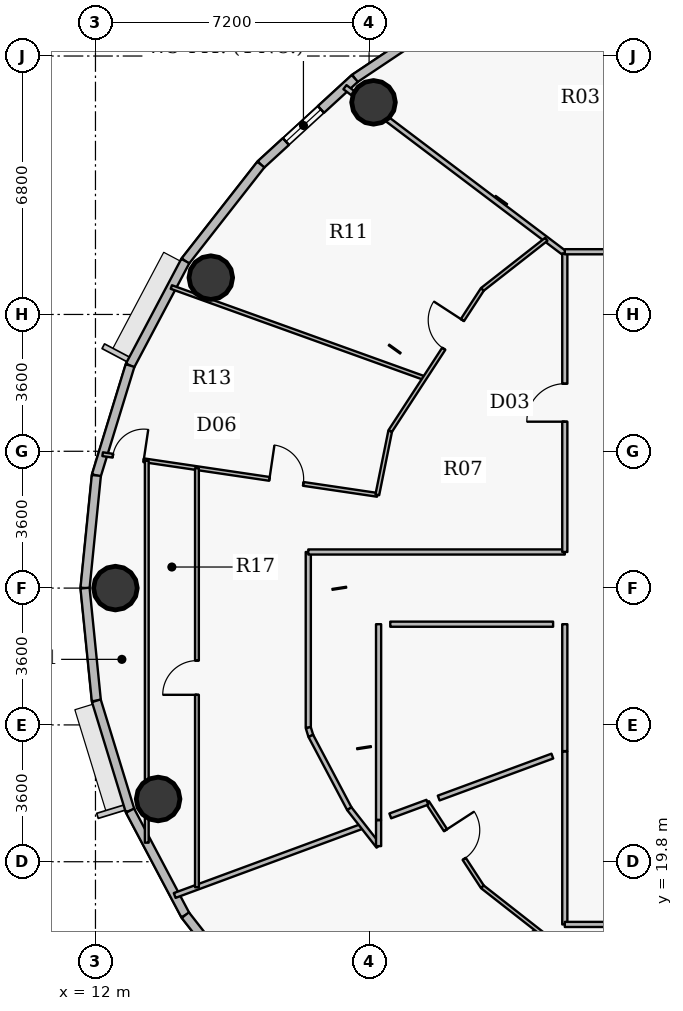
"""IFC4 building model, lengths in metres.
Left out: names, types, materials, properties, quantities, classifications, styles, units other than length and angle.
Written with IfcOpenShell. Run it as: python <this file> out.ifc"""

import sys

from ifc_helpers import new_model, si_unit, direction, frame, frame_2d, origin, origin_2d, place, context, subcontext, project, spatial, rectangle, hollow_circle, extrude, source, transform, mapped, element, fill, save


model = new_model("IFC4")
c1 = context("Model", 3, precision=1e-05, world=origin(), true_north=direction((0.0, 1.0)))
c2 = subcontext(c1, "Body", "Model", "MODEL_VIEW")
j1 = project(units=[si_unit("LENGTHUNIT", "METRE"), si_unit("PLANEANGLEUNIT", "RADIAN")], contexts=[c1])
p1 = place(None, origin())
s1 = spatial("IfcSite", under=j1, at=p1, CompositionType="ELEMENT")
p2 = place(p1, origin())
s2 = spatial("IfcBuilding", under=s1, at=p2, CompositionType="ELEMENT")
p3 = place(p2, frame((0.0, 0.0, 214.05)))
s3 = spatial("IfcBuildingStorey", under=s2, at=p3, CompositionType="ELEMENT", Elevation=214.05)
for number, where, z_axis, x_axis in (
    (1, (19.317, 39.781, 0.0), (0.0, 0.0, 1.0), (1.0, 0.0, 0.0)),
    (2, (15.035, 35.169, 0.0), (0.0, 0.0, 1.0), (1.0, 0.0, 0.0)),
    (3, (12.525, 27.0, 0.0), (0.0, 0.0, 1.0), (1.0, 0.0, 0.0)),
    (4, (13.649, 21.451, 0.0), (0.0, 0.0, 1.0), (1.0, 0.0, 0.0)),
):
    element("IfcColumn", number, at=place(p3, frame(where, z_axis=z_axis, x_axis=x_axis)), inside=s3, PredefinedType="COLUMN", context=c2, shape_type="SweptSolid", body=[
        extrude(hollow_circle(Radius=0.575, WallThickness=0.036, at=origin_2d()), origin(), (0.0, 0.0, 1.0), 3.75),
    ])
p4 = place(p3, frame((18.824, 40.411, 0.0), z_axis=(0.0, 0.0, 1.0), x_axis=(0.831262496074, 0.555880079352, 0.0)))
e5 = element("IfcWall", 5, at=p4, inside=s3, PredefinedType="SOLIDWALL", context=c2, shape_type="SweptSolid", body=[
    extrude(rectangle(XDim=3.484, YDim=0.24, at=frame_2d((1.742, 0.0))), origin(), (0.0, 0.0, 1.0), 3.5),
])
p5 = place(p3, frame((16.352, 38.145, 0.0), z_axis=(0.0, 0.0, 1.0), x_axis=(0.737123922599, 0.675757591694, 0.0)))
e6 = element("IfcWall", 6, at=p5, inside=s3, PredefinedType="SOLIDWALL", context=c2, shape_type="SweptSolid", body=[
    extrude(rectangle(XDim=3.354, YDim=0.24, at=frame_2d((1.677, 0.0))), origin(), (0.0, 0.0, 1.0), 3.5),
])
p6 = place(p5, frame((0.896, 0.0, 0.9)))
e7 = element("IfcOpeningElement", 7, at=p6, cuts=e6, PredefinedType="OPENING", context=c2, shape_type="SweptSolid", body=[
    extrude(rectangle(XDim=1.25, YDim=1.65, at=origin_2d()), frame((0.625, 0.13, 0.825), z_axis=(0.0, -1.0, 0.0), x_axis=(1.0, 0.0, 0.0)), (0.0, 0.0, 1.0), 0.26),
])
p7 = place(p3, frame((14.364, 35.605, 0.0), z_axis=(0.0, 0.0, 1.0), x_axis=(0.616312344705, 0.787501805562, 0.0)))
e8 = element("IfcWall", 8, at=p7, inside=s3, PredefinedType="SOLIDWALL", context=c2, shape_type="SweptSolid", body=[
    extrude(rectangle(XDim=3.225, YDim=0.24, at=frame_2d((1.612, 0.0))), origin(), (0.0, 0.0, 1.0), 3.5),
])
p8 = place(p3, frame((12.91, 32.856, 0.0), z_axis=(0.0, 0.0, 1.0), x_axis=(0.46766049993, 0.883908172157, 0.0)))
e9 = element("IfcWall", 9, at=p8, inside=s3, PredefinedType="SOLIDWALL", context=c2, shape_type="SweptSolid", body=[
    extrude(rectangle(XDim=3.11, YDim=0.24, at=frame_2d((1.555, 0.0))), origin(), (0.0, 0.0, 1.0), 3.5),
])
p9 = place(p3, frame((12.023, 29.964, 0.0), z_axis=(0.0, 0.0, 1.0), x_axis=(0.293132907334, 0.95607170162, 0.0)))
e10 = element("IfcWall", 10, at=p9, inside=s3, PredefinedType="SOLIDWALL", context=c2, shape_type="SweptSolid", body=[
    extrude(rectangle(XDim=3.025, YDim=0.24, at=frame_2d((1.512, 0.0))), origin(), (0.0, 0.0, 1.0), 3.5),
])
for number, where, z_axis, x_axis in (
    (11, (11.725, 27.0, 0.0), (0.0, 0.0, 1.0), (0.1, 0.995, 0.0)),
    (12, (12.023, 24.036, 0.0), (0.0, 0.0, 1.0), (-0.1, 0.995, 0.0)),
):
    element("IfcWall", number, at=place(p3, frame(where, z_axis=z_axis, x_axis=x_axis)), inside=s3, PredefinedType="SOLIDWALL", context=c2, shape_type="SweptSolid", body=[
        extrude(rectangle(XDim=2.979, YDim=0.24, at=frame_2d((1.489, 0.0))), origin(), (0.0, 0.0, 1.0), 3.5),
    ])
p10 = place(p3, frame((12.91, 21.144, 0.0), z_axis=(0.0, 0.0, 1.0), x_axis=(-0.293132907334, 0.95607170162, 0.0)))
e13 = element("IfcWall", 13, at=p10, inside=s3, PredefinedType="SOLIDWALL", context=c2, shape_type="SweptSolid", body=[
    extrude(rectangle(XDim=3.025, YDim=0.24, at=frame_2d((1.512, 0.0))), origin(), (0.0, 0.0, 1.0), 3.5),
])
p11 = place(p3, frame((14.364, 18.395, 0.0), z_axis=(0.0, 0.0, 1.0), x_axis=(-0.46766049993, 0.883908172157, 0.0)))
e14 = element("IfcWall", 14, at=p11, inside=s3, PredefinedType="SOLIDWALL", context=c2, shape_type="SweptSolid", body=[
    extrude(rectangle(XDim=3.11, YDim=0.24, at=frame_2d((1.555, 0.0))), origin(), (0.0, 0.0, 1.0), 3.5),
])
p12 = place(p3, frame((16.352, 15.855, 0.0), z_axis=(0.0, 0.0, 1.0), x_axis=(-0.616312344705, 0.787501805562, 0.0)))
e15 = element("IfcWall", 15, at=p12, inside=s3, PredefinedType="SOLIDWALL", context=c2, shape_type="SweptSolid", body=[
    extrude(rectangle(XDim=3.225, YDim=0.24, at=frame_2d((1.612, 0.0))), origin(), (0.0, 0.0, 1.0), 3.5),
])
p13 = place(p12, frame((0.812, 0.0, 0.9)))
e16 = element("IfcOpeningElement", 16, at=p13, cuts=e15, PredefinedType="OPENING", context=c2, shape_type="SweptSolid", body=[
    extrude(rectangle(XDim=1.6, YDim=1.75, at=origin_2d()), frame((0.8, 0.13, 0.875), z_axis=(0.0, -1.0, 0.0), x_axis=(1.0, 0.0, 0.0)), (0.0, 0.0, 1.0), 0.26),
])
p14 = place(p3, frame((12.189, 30.523, 0.0), z_axis=(0.0, 0.0, 1.0), x_axis=(0.98923000083, -0.146369414352, 0.0)))
e17 = element("IfcWall", 17, at=p14, inside=s3, PredefinedType="PARTITIONING", context=c2, shape_type="SweptSolid", body=[
    extrude(rectangle(XDim=7.306, YDim=0.1, at=frame_2d((3.653, 0.0))), origin(), (0.0, 0.0, 1.0), 2.985),
])
p15 = place(p14, frame((4.437, 0.0, 0.0)))
e18 = element("IfcOpeningElement", 18, at=p15, cuts=e17, PredefinedType="OPENING", context=c2, shape_type="SweptSolid", body=[
    extrude(rectangle(XDim=0.9, YDim=2.1, at=origin_2d()), frame((0.45, 0.06, 1.05), z_axis=(0.0, -1.0, 0.0), x_axis=(1.0, 0.0, 0.0)), (0.0, 0.0, 1.0), 0.12),
])
p16 = place(p14, frame((0.272, 0.0, 0.0)))
e19 = element("IfcOpeningElement", 19, at=p16, cuts=e17, PredefinedType="OPENING", context=c2, shape_type="SweptSolid", body=[
    extrude(rectangle(XDim=0.82, YDim=2.1, at=origin_2d()), frame((0.41, 0.06, 1.05), z_axis=(0.0, -1.0, 0.0), x_axis=(1.0, 0.0, 0.0)), (0.0, 0.0, 1.0), 0.12),
])
p17 = place(p3, frame((13.35, 20.301, 0.0), z_axis=(0.0, 0.0, 1.0), x_axis=(0.0, 1.0, 0.0)))
e20 = element("IfcWall", 20, at=p17, inside=s3, PredefinedType="PARTITIONING", context=c2, shape_type="SweptSolid", body=[
    extrude(rectangle(XDim=10.05, YDim=0.1, at=frame_2d((5.025, 0.0))), origin(), (0.0, 0.0, 1.0), 2.935),
])
p18 = place(p3, frame((13.997, 34.921, 0.0), z_axis=(0.0, 0.0, 1.0), x_axis=(0.940885654064, -0.338724351023, 0.0)))
e21 = element("IfcWall", 21, at=p18, inside=s3, PredefinedType="PARTITIONING", context=c2, shape_type="SweptSolid", body=[
    extrude(rectangle(XDim=7.082, YDim=0.1, at=frame_2d((3.541, 0.0))), origin(), (0.0, 0.0, 1.0), 2.985),
])
p19 = place(p3, frame((14.085, 18.912, 0.0), z_axis=(0.0, 0.0, 1.0), x_axis=(0.938158194698, 0.346206877055, 0.0)))
e22 = element("IfcWall", 22, at=p19, inside=s3, PredefinedType="PARTITIONING", context=c2, shape_type="SweptSolid", body=[
    extrude(rectangle(XDim=5.278, YDim=0.135, at=frame_2d((2.639, 0.0))), origin(), (0.0, 0.0, 1.0), 2.985),
])
p20 = place(p3, frame((14.67, 19.128, 0.0), z_axis=(0.0, 0.0, 1.0), x_axis=(0.0, 1.0, 0.0)))
e23 = element("IfcWall", 23, at=p20, inside=s3, PredefinedType="PARTITIONING", context=c2, shape_type="SweptSolid", body=[
    extrude(rectangle(XDim=11.028, YDim=0.1, at=frame_2d((5.514, 0.0))), origin(), (0.0, 0.0, 1.0), 2.935),
])
p21 = place(p20, frame((5.064, 0.0, 0.0)))
e24 = element("IfcOpeningElement", 24, at=p21, cuts=e23, PredefinedType="OPENING", context=c2, shape_type="SweptSolid", body=[
    extrude(rectangle(XDim=0.9, YDim=2.1, at=origin_2d()), frame((0.45, 0.06, 1.05), z_axis=(0.0, -1.0, 0.0), x_axis=(1.0, 0.0, 0.0)), (0.0, 0.0, 1.0), 0.12),
])
p22 = place(p3, frame((17.6, 23.328, 0.0), z_axis=(0.0, 0.0, 1.0), x_axis=(0.0, 1.0, 0.0)))
e25 = element("IfcWall", 25, at=p22, inside=s3, PredefinedType="PARTITIONING", context=c2, shape_type="SweptSolid", body=[
    extrude(rectangle(XDim=4.622, YDim=0.135, at=frame_2d((2.311, 0.0))), origin(), (0.0, 0.0, 1.0), 2.935),
])
p23 = place(p3, frame((17.6, 23.328, 0.0), z_axis=(0.0, 0.0, 1.0), x_axis=(0.292875000845, -0.956150738053, 0.0)))
e26 = element("IfcWall", 26, at=p23, inside=s3, PredefinedType="PARTITIONING", context=c2, shape_type="SweptSolid", body=[
    extrude(rectangle(XDim=0.227, YDim=0.135, at=frame_2d((0.113, 0.0))), origin(), (0.0, 0.0, 1.0), 3.5),
])
p24 = place(p3, frame((17.6, 27.95, 0.0), z_axis=(0.0, 0.0, 1.0), x_axis=(1.0, 0.0, 0.0)))
e27 = element("IfcWall", 27, at=p24, inside=s3, PredefinedType="PARTITIONING", context=c2, shape_type="SweptSolid", body=[
    extrude(rectangle(XDim=6.75, YDim=0.135, at=frame_2d((3.375, 0.0))), origin(), (0.0, 0.0, 1.0), 3.5),
])
p25 = place(p3, frame((17.667, 23.111, 0.0), z_axis=(0.0, 0.0, 1.0), x_axis=(0.467675622269, -0.883900171024, 0.0)))
e28 = element("IfcWall", 28, at=p25, inside=s3, PredefinedType="PARTITIONING", context=c2, shape_type="SweptSolid", body=[
    extrude(rectangle(XDim=2.168, YDim=0.135, at=frame_2d((1.084, 0.0))), origin(), (0.0, 0.0, 1.0), 2.935),
])
p26 = place(p3, frame((18.268, 14.092, 0.0), z_axis=(0.0, 0.0, 1.0), x_axis=(0.808481640117, 0.588521399436, 0.0)))
e29 = element("IfcWall", 29, at=p26, inside=s3, PredefinedType="PARTITIONING", context=c2, shape_type="SweptSolid", body=[
    extrude(rectangle(XDim=6.641, YDim=0.1, at=frame_2d((3.32, 0.0))), origin(), (0.0, 0.0, 1.0), 2.985),
])
p27 = place(p3, frame((18.565, 40.18, 0.0), z_axis=(0.0, 0.0, 1.0), x_axis=(0.797711861377, -0.603038793295, 0.0)))
e30 = element("IfcWall", 30, at=p27, inside=s3, PredefinedType="PARTITIONING", context=c2, shape_type="SweptSolid", body=[
    extrude(rectangle(XDim=7.252, YDim=0.135, at=frame_2d((3.626, 0.0))), origin(), (0.0, 0.0, 1.0), 2.935),
])
p28 = place(p3, frame((18.681, 21.194, 0.0), z_axis=(0.0, 0.0, 1.0), x_axis=(0.616239706802, -0.787558647823, 0.0)))
e31 = element("IfcWall", 31, at=p28, inside=s3, PredefinedType="PARTITIONING", context=c2, shape_type="SweptSolid", body=[
    extrude(rectangle(XDim=1.248, YDim=0.135, at=frame_2d((0.624, 0.0))), origin(), (0.0, 0.0, 1.0), 3.5),
])
p29 = place(p3, frame((19.416, 29.454, 0.0), z_axis=(0.0, 0.0, 1.0), x_axis=(0.198253557863, 0.980150767379, 0.0)))
e32 = element("IfcWall", 32, at=p29, inside=s3, PredefinedType="PARTITIONING", context=c2, shape_type="SweptSolid", body=[
    extrude(rectangle(XDim=1.713, YDim=0.1, at=frame_2d((0.856, 0.0))), origin(), (0.0, 0.0, 1.0), 3.5),
])
p30 = place(p3, frame((19.45, 20.211, 0.0), z_axis=(0.0, 0.0, 1.0), x_axis=(0.0, 1.0, 0.0)))
e33 = element("IfcWall", 33, at=p30, inside=s3, PredefinedType="PARTITIONING", context=c2, shape_type="SweptSolid", body=[
    extrude(rectangle(XDim=0.681, YDim=0.135, at=frame_2d((0.34, 0.0))), origin(), (0.0, 0.0, 1.0), 3.5),
])
p31 = place(p3, frame((19.756, 31.133, 0.0), z_axis=(0.0, 0.0, 1.0), x_axis=(0.545406924684, 0.83817139447, 0.0)))
e34 = element("IfcWall", 34, at=p31, inside=s3, PredefinedType="PARTITIONING", context=c2, shape_type="SweptSolid", body=[
    extrude(rectangle(XDim=4.448, YDim=0.1, at=frame_2d((2.224, 0.0))), origin(), (0.0, 0.0, 1.0), 2.935),
])
p32 = place(p31, frame((2.583, 0.0, 0.0)))
e35 = element("IfcOpeningElement", 35, at=p32, cuts=e34, PredefinedType="OPENING", context=c2, shape_type="SweptSolid", body=[
    extrude(rectangle(XDim=0.9, YDim=2.1, at=origin_2d()), frame((0.45, 0.06, 1.05), z_axis=(0.0, -1.0, 0.0), x_axis=(1.0, 0.0, 0.0)), (0.0, 0.0, 1.0), 0.12),
])
p33 = place(p3, frame((20.733, 21.366, 0.0), z_axis=(0.0, 0.0, 1.0), x_axis=(0.545375949152, -0.838191549758, 0.0)))
e36 = element("IfcWall", 36, at=p33, inside=s3, PredefinedType="PARTITIONING", context=c2, shape_type="SweptSolid", body=[
    extrude(rectangle(XDim=2.656, YDim=0.1, at=frame_2d((1.328, 0.0))), origin(), (0.0, 0.0, 1.0), 3.5),
])
p34 = place(p33, frame((0.878, 0.0, 0.0)))
e37 = element("IfcOpeningElement", 37, at=p34, cuts=e36, PredefinedType="OPENING", context=c2, shape_type="SweptSolid", body=[
    extrude(rectangle(XDim=0.9, YDim=2.1, at=origin_2d()), frame((0.45, 0.06, 1.05), z_axis=(0.0, -1.0, 0.0), x_axis=(1.0, 0.0, 0.0)), (0.0, 0.0, 1.0), 0.12),
])
p35 = place(p3, frame((22.182, 19.139, 0.0), z_axis=(0.0, 0.0, 1.0), x_axis=(0.787386902975, -0.616459134917, 0.0)))
e38 = element("IfcWall", 38, at=p35, inside=s3, PredefinedType="PARTITIONING", context=c2, shape_type="SweptSolid", body=[
    extrude(rectangle(XDim=4.799, YDim=0.1, at=frame_2d((2.399, 0.0))), origin(), (0.0, 0.0, 1.0), 2.935),
])
p36 = place(p3, frame((22.182, 34.861, 0.0), z_axis=(0.0, 0.0, 1.0), x_axis=(0.787401156588, 0.616440928722, 0.0)))
e39 = element("IfcWall", 39, at=p36, inside=s3, PredefinedType="PARTITIONING", context=c2, shape_type="SweptSolid", body=[
    extrude(rectangle(XDim=2.134, YDim=0.1, at=frame_2d((1.067, 0.0))), origin(), (0.0, 0.0, 1.0), 2.935),
])
p37 = place(p3, frame((24.35, 18.15, 0.0), z_axis=(0.0, 0.0, 1.0), x_axis=(0.0, 1.0, 0.0)))
e40 = element("IfcWall", 40, at=p37, inside=s3, PredefinedType="PARTITIONING", context=c2, shape_type="SweptSolid", body=[
    extrude(rectangle(XDim=4.551, YDim=0.135, at=frame_2d((2.275, 0.0))), origin(), (0.0, 0.0, 1.0), 2.935),
])
p38 = place(p3, frame((24.35, 18.15, 0.0), z_axis=(0.0, 0.0, 1.0), x_axis=(1.0, 0.0, 0.0)))
e41 = element("IfcWall", 41, at=p38, inside=s3, PredefinedType="PARTITIONING", context=c2, shape_type="SweptSolid", body=[
    extrude(rectangle(XDim=23.85, YDim=0.135, at=frame_2d((11.925, 0.0))), origin(), (0.0, 0.0, 1.0), 2.935),
])
p39 = place(p38, frame((2.87, 0.0, 0.0)))
e42 = element("IfcOpeningElement", 42, at=p39, cuts=e41, PredefinedType="OPENING", context=c2, shape_type="SweptSolid", body=[
    extrude(rectangle(XDim=1.0, YDim=2.15, at=origin_2d()), frame((0.5, 0.078, 1.075), z_axis=(0.0, -1.0, 0.0), x_axis=(1.0, 0.0, 0.0)), (0.0, 0.0, 1.0), 0.155),
])
p40 = place(p38, frame((16.13, 0.0, 0.0)))
e43 = element("IfcOpeningElement", 43, at=p40, cuts=e41, PredefinedType="OPENING", context=c2, shape_type="SweptSolid", body=[
    extrude(rectangle(XDim=1.0, YDim=2.15, at=origin_2d()), frame((0.5, 0.078, 1.075), z_axis=(0.0, -1.0, 0.0), x_axis=(1.0, 0.0, 0.0)), (0.0, 0.0, 1.0), 0.155),
])
p41 = place(p3, frame((24.35, 27.95, 0.0), z_axis=(0.0, 0.0, 1.0), x_axis=(0.0, 1.0, 0.0)))
e44 = element("IfcWall", 44, at=p41, inside=s3, PredefinedType="PARTITIONING", context=c2, shape_type="SweptSolid", body=[
    extrude(rectangle(XDim=7.857, YDim=0.135, at=frame_2d((3.929, 0.0))), origin(), (0.0, 0.0, 1.0), 2.935),
])
p42 = place(p41, frame((3.429, 0.0, 0.0)))
e45 = element("IfcOpeningElement", 45, at=p42, cuts=e44, PredefinedType="OPENING", context=c2, shape_type="SweptSolid", body=[
    extrude(rectangle(XDim=1.0, YDim=2.15, at=origin_2d()), frame((0.5, 0.078, 1.075), z_axis=(0.0, -1.0, 0.0), x_axis=(1.0, 0.0, 0.0)), (0.0, 0.0, 1.0), 0.155),
])
p43 = place(p3, frame((24.35, 35.85, 0.0), z_axis=(0.0, 0.0, 1.0), x_axis=(1.0, 0.0, 0.0)))
e46 = element("IfcWall", 46, at=p43, inside=s3, PredefinedType="PARTITIONING", context=c2, shape_type="SweptSolid", body=[
    extrude(rectangle(XDim=26.218, YDim=0.135, at=frame_2d((13.109, 0.0))), origin(), (0.0, 0.0, 1.0), 2.935),
])
p44 = place(p43, frame((21.507, 0.0, 0.0)))
e47 = element("IfcOpeningElement", 47, at=p44, cuts=e46, PredefinedType="OPENING", context=c2, shape_type="SweptSolid", body=[
    extrude(rectangle(XDim=1.0, YDim=2.15, at=origin_2d()), frame((0.5, 0.078, 1.075), z_axis=(0.0, -1.0, 0.0), x_axis=(1.0, 0.0, 0.0)), (0.0, 0.0, 1.0), 0.155),
])
p45 = place(p43, frame((12.95, 0.0, 0.0)))
e48 = element("IfcOpeningElement", 48, at=p45, cuts=e46, PredefinedType="OPENING", context=c2, shape_type="SweptSolid", body=[
    extrude(rectangle(XDim=1.0, YDim=2.15, at=origin_2d()), frame((0.5, 0.078, 1.075), z_axis=(0.0, -1.0, 0.0), x_axis=(1.0, 0.0, 0.0)), (0.0, 0.0, 1.0), 0.155),
])
p46 = place(p43, frame((2.293, 0.0, 0.0)))
e49 = element("IfcOpeningElement", 49, at=p46, cuts=e46, PredefinedType="OPENING", context=c2, shape_type="SweptSolid", body=[
    extrude(rectangle(XDim=1.0, YDim=2.15, at=origin_2d()), frame((0.5, 0.078, 1.075), z_axis=(0.0, -1.0, 0.0), x_axis=(1.0, 0.0, 0.0)), (0.0, 0.0, 1.0), 0.155),
])
p47 = place(p3, frame((19.45, 26.05, 0.0), z_axis=(0.0, 0.0, 1.0), x_axis=(0.0, -1.0, 0.0)))
e50 = element("IfcWall", 50, at=p47, inside=s3, PredefinedType="PARTITIONING", context=c2, shape_type="SweptSolid", body=[
    extrude(rectangle(XDim=5.148, YDim=0.135, at=frame_2d((2.574, 0.0))), origin(), (0.0, 0.0, 1.0), 2.935),
])
p48 = place(p3, frame((24.35, 22.71, 0.0), z_axis=(0.0, 0.0, 1.0), x_axis=(0.0, 1.0, 0.0)))
e51 = element("IfcWall", 51, at=p48, inside=s3, PredefinedType="PARTITIONING", context=c2, shape_type="SweptSolid", body=[
    extrude(rectangle(XDim=3.34, YDim=0.135, at=frame_2d((1.67, 0.0))), origin(), (0.0, 0.0, 1.0), 2.935),
])
p49 = place(p3, frame((24.042, 26.05, 0.0), z_axis=(0.0, 0.0, 1.0), x_axis=(-1.0, 0.0, 0.0)))
e52 = element("IfcWall", 52, at=p49, inside=s3, PredefinedType="PARTITIONING", context=c2, shape_type="SweptSolid", body=[
    extrude(rectangle(XDim=4.285, YDim=0.135, at=frame_2d((2.143, 0.0))), origin(), (0.0, 0.0, 1.0), 3.5),
])
p50 = place(p3, frame((21.031, 21.476, 0.0), z_axis=(0.0, 0.0, 1.0), x_axis=(0.938166504217, 0.346184358926, 0.0)))
e53 = element("IfcWall", 53, at=p50, inside=s3, PredefinedType="PARTITIONING", context=c2, shape_type="SweptSolid", body=[
    extrude(rectangle(XDim=3.188, YDim=0.135, at=frame_2d((1.594, 0.0))), origin(), (0.0, 0.0, 1.0), 3.5),
])
p51 = place(p3, frame((19.758, 21.006, 0.0), z_axis=(0.0, 0.0, 1.0), x_axis=(0.938130503792, 0.346281905179, 0.0)))
e54 = element("IfcWall", 54, at=p51, inside=s3, PredefinedType="PARTITIONING", context=c2, shape_type="SweptSolid", body=[
    extrude(rectangle(XDim=1.04, YDim=0.135, at=frame_2d((0.52, 0.0))), origin(), (0.0, 0.0, 1.0), 3.5),
])
m1 = source(origin(), c2, "Body", "SweptSolid", [
    extrude(rectangle(XDim=1.25, YDim=1.65, at=origin_2d()), frame((0.625, 0.03, 0.825), z_axis=(0.0, -1.0, 0.0), x_axis=(1.0, 0.0, 0.0)), (0.0, 0.0, 1.0), 0.06),
])
p52 = place(p6, origin())
e55 = element("IfcWindow", 55, at=p52, inside=s3, PartitioningType="SINGLE_PANEL", PredefinedType="WINDOW", context=c2, shape_type="MappedRepresentation", body=[
    mapped(m1, transform((0.0, 0.0, 0.0), x_axis=(1.0, 0.0, 0.0), y_axis=(0.0, 1.0, 0.0), z_axis=(0.0, 0.0, 1.0), scale=1.0)),
])
fill(e7, e55)
m2 = source(origin(), c2, "Body", "SweptSolid", [
    extrude(rectangle(XDim=1.0, YDim=2.15, at=origin_2d()), frame((0.5, 0.025, 1.075), z_axis=(0.0, -1.0, 0.0), x_axis=(1.0, 0.0, 0.0)), (0.0, 0.0, 1.0), 0.05),
])
p53 = place(p42, origin())
e56 = element("IfcDoor", 56, at=p53, inside=s3, OperationType="SINGLE_SWING_LEFT", PredefinedType="DOOR", context=c2, shape_type="MappedRepresentation", body=[
    mapped(m2, transform((0.0, 0.0, 0.0), x_axis=(1.0, 0.0, 0.0), y_axis=(0.0, 1.0, 0.0), z_axis=(0.0, 0.0, 1.0), scale=1.0)),
])
fill(e45, e56)
m3 = source(origin(), c2, "Body", "SweptSolid", [
    extrude(rectangle(XDim=0.9, YDim=2.1, at=origin_2d()), frame((0.45, 0.025, 1.05), z_axis=(0.0, -1.0, 0.0), x_axis=(1.0, 0.0, 0.0)), (0.0, 0.0, 1.0), 0.05),
])
p54 = place(p32, origin())
e57 = element("IfcDoor", 57, at=p54, inside=s3, OperationType="SINGLE_SWING_RIGHT", PredefinedType="DOOR", context=c2, shape_type="MappedRepresentation", body=[
    mapped(m3, transform((0.0, 0.0, 0.0), x_axis=(1.0, 0.0, 0.0), y_axis=(0.0, 1.0, 0.0), z_axis=(0.0, 0.0, 1.0), scale=1.0)),
])
fill(e35, e57)
p55 = place(p15, origin())
e58 = element("IfcDoor", 58, at=p55, inside=s3, OperationType="SINGLE_SWING_LEFT", PredefinedType="DOOR", context=c2, shape_type="MappedRepresentation", body=[
    mapped(m3, transform((0.0, 0.0, 0.0), x_axis=(1.0, 0.0, 0.0), y_axis=(0.0, 1.0, 0.0), z_axis=(0.0, 0.0, 1.0), scale=1.0)),
])
fill(e18, e58)
m4 = source(origin(), c2, "Body", "SweptSolid", [
    extrude(rectangle(XDim=0.82, YDim=2.1, at=origin_2d()), frame((0.41, 0.025, 1.05), z_axis=(0.0, -1.0, 0.0), x_axis=(1.0, 0.0, 0.0)), (0.0, 0.0, 1.0), 0.05),
])
p56 = place(p16, origin())
e59 = element("IfcDoor", 59, at=p56, inside=s3, OperationType="SINGLE_SWING_RIGHT", PredefinedType="DOOR", context=c2, shape_type="MappedRepresentation", body=[
    mapped(m4, transform((0.0, 0.0, 0.0), x_axis=(1.0, 0.0, 0.0), y_axis=(0.0, 1.0, 0.0), z_axis=(0.0, 0.0, 1.0), scale=1.0)),
])
fill(e19, e59)
p57 = place(p21, origin())
e60 = element("IfcDoor", 60, at=p57, inside=s3, OperationType="SINGLE_SWING_LEFT", PredefinedType="DOOR", context=c2, shape_type="MappedRepresentation", body=[
    mapped(m3, transform((0.0, 0.0, 0.0), x_axis=(1.0, 0.0, 0.0), y_axis=(0.0, 1.0, 0.0), z_axis=(0.0, 0.0, 1.0), scale=1.0)),
])
fill(e24, e60)
p58 = place(p34, origin())
e61 = element("IfcDoor", 61, at=p58, inside=s3, OperationType="SINGLE_SWING_LEFT", PredefinedType="DOOR", context=c2, shape_type="MappedRepresentation", body=[
    mapped(m3, transform((0.0, 0.0, 0.0), x_axis=(1.0, 0.0, 0.0), y_axis=(0.0, 1.0, 0.0), z_axis=(0.0, 0.0, 1.0), scale=1.0)),
])
fill(e37, e61)
save(model, sys.argv[1])
